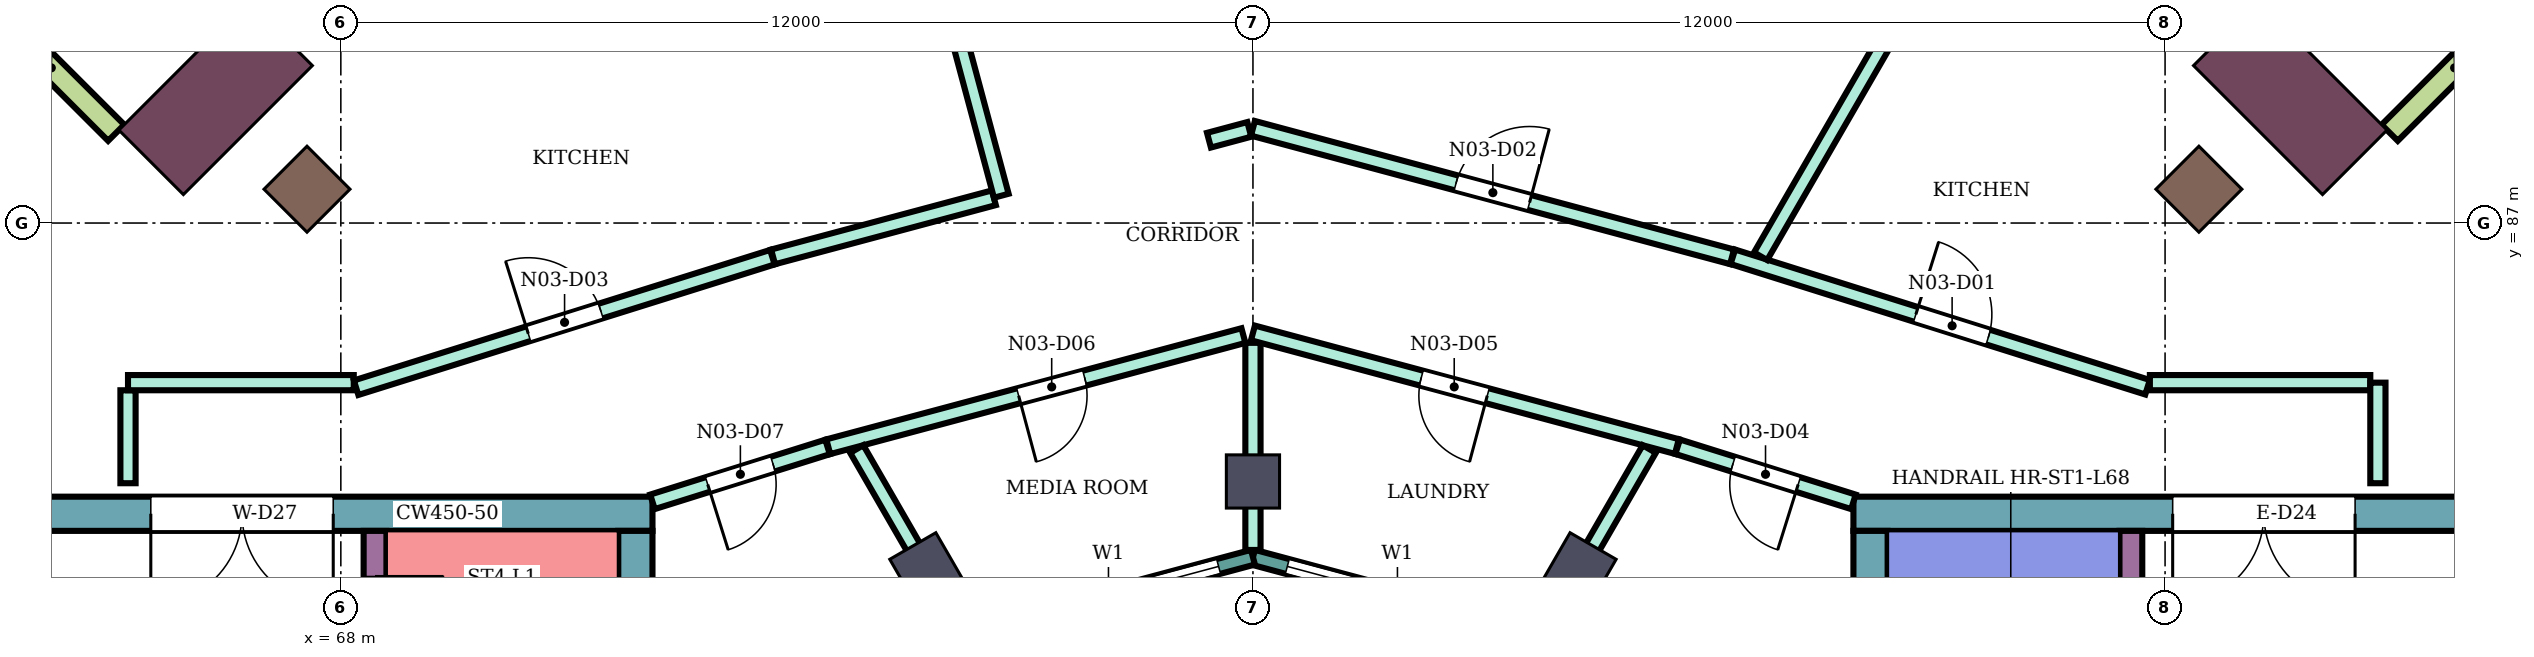
"""IFC4 building model, lengths in metres.
Left out: names, types, materials, properties, quantities, classifications, styles, units other than length and angle.
Written with IfcOpenShell. Run it as: python <this file> out.ifc"""

import sys

from ifc_helpers import new_model, si_unit, direction, frame, frame_2d, origin, origin_2d, place, context, subcontext, project, spatial, rectangle, extrude, element, fill, save


model = new_model("IFC4")
c1 = context("Model", 3, precision=1e-05, world=origin(), true_north=direction((0.0, 1.0)))
c2 = subcontext(c1, "Body", "Model", "MODEL_VIEW")
j1 = project(units=[si_unit("LENGTHUNIT", "METRE"), si_unit("PLANEANGLEUNIT", "RADIAN")], contexts=[c1])
p1 = place(None, origin())
s1 = spatial("IfcSite", under=j1, at=p1, CompositionType="ELEMENT")
p2 = place(p1, origin())
s2 = spatial("IfcBuilding", under=s1, at=p2, CompositionType="ELEMENT")
p3 = place(p2, frame((0.0, 0.0, 296.7)))
s3 = spatial("IfcBuildingStorey", under=s2, at=p3, CompositionType="ELEMENT", Elevation=296.7)
for number, where, z_axis, x_axis in (
    (1, (92.445, 87.445, 0.0), (0.0, 0.0, 1.0), (0.707, 0.707, 0.0)),
    (2, (67.555, 87.445, 0.0), (0.0, 0.0, 1.0), (-0.707, 0.707, 0.0)),
):
    element("IfcColumn", number, at=place(p3, frame(where, z_axis=z_axis, x_axis=x_axis)), inside=s3, PredefinedType="COLUMN", context=c2, shape_type="SweptSolid", body=[
        extrude(rectangle(XDim=0.8, YDim=0.8, at=origin_2d()), origin(), (0.0, 0.0, 1.0), 4.2),
    ])
for number, where, z_axis, x_axis in (
    (3, (84.3, 82.448, 0.0), (0.0, 0.0, 1.0), (0.5, 0.866, 0.0)),
    (4, (80.0, 83.6, 0.0), (0.0, 0.0, 1.0), (0.0, 1.0, 0.0)),
    (5, (75.7, 82.448, 0.0), (0.0, 0.0, 1.0), (-0.5, 0.866, 0.0)),
):
    element("IfcColumn", number, at=place(p3, frame(where, z_axis=z_axis, x_axis=x_axis)), inside=s3, PredefinedType="COLUMN", context=c2, shape_type="SweptSolid", body=[
        extrude(rectangle(XDim=0.7, YDim=0.7, at=origin_2d()), origin(), (0.0, 0.0, 1.0), 4.2),
    ])
for number, where, z_axis, x_axis in (
    (6, (93.647, 88.647, 0.0), (0.0, 0.0, 1.0), (0.707, 0.707, 0.0)),
    (7, (66.353, 88.647, 0.0), (0.0, 0.0, 1.0), (-0.707, 0.707, 0.0)),
):
    element("IfcColumn", number, at=place(p3, frame(where, z_axis=z_axis, x_axis=x_axis)), inside=s3, PredefinedType="COLUMN", context=c2, shape_type="SweptSolid", body=[
        extrude(rectangle(XDim=1.2, YDim=2.4, at=origin_2d()), origin(), (0.0, 0.0, 1.0), 4.2),
    ])
p4 = place(p3, frame((87.9, 83.175, 0.0), z_axis=(0.0, 0.0, 1.0), x_axis=(1.0, 0.0, 0.0)))
e8 = element("IfcWall", 8, at=p4, inside=s3, PredefinedType="SHEAR", context=c2, shape_type="SweptSolid", body=[
    extrude(rectangle(XDim=12.0, YDim=0.45, at=frame_2d((6.0, 0.0))), origin(), (0.0, 0.0, 1.0), 3.88),
])
p5 = place(p4, frame((4.2, 0.0, 0.0)))
e9 = element("IfcOpeningElement", 9, at=p5, cuts=e8, PredefinedType="OPENING", context=c2, shape_type="SweptSolid", body=[
    extrude(rectangle(XDim=2.4, YDim=2.4, at=frame_2d((1.2, 1.2))), frame((0.0, 0.235, 0.0), z_axis=(0.0, -1.0, 0.0), x_axis=(1.0, 0.0, 0.0)), (0.0, 0.0, 1.0), 0.47),
])
p6 = place(p3, frame((88.125, 75.0, 0.0), z_axis=(0.0, 0.0, 1.0), x_axis=(0.0, 1.0, 0.0)))
e10 = element("IfcWall", 10, at=p6, inside=s3, PredefinedType="SHEAR", context=c2, shape_type="SweptSolid", body=[
    extrude(rectangle(XDim=7.95, YDim=0.45, at=frame_2d((3.975, 0.0))), origin(), (0.0, 0.0, 1.0), 3.88),
])
p7 = place(p3, frame((91.55, 75.0, 0.0), z_axis=(0.0, 0.0, 1.0), x_axis=(0.0, 1.0, 0.0)))
e11 = element("IfcWall", 11, at=p7, inside=s3, PredefinedType="SHEAR", context=c2, shape_type="SweptSolid", body=[
    extrude(rectangle(XDim=7.95, YDim=0.3, at=frame_2d((3.975, 0.0))), origin(), (0.0, 0.0, 1.0), 3.88),
])
p8 = place(p7, frame((1.85, 0.0, 0.0)))
e12 = element("IfcOpeningElement", 12, at=p8, cuts=e11, PredefinedType="OPENING", context=c2, shape_type="SweptSolid", body=[
    extrude(rectangle(XDim=0.9, YDim=2.1, at=frame_2d((0.45, 1.05))), frame((0.0, 0.16, 0.0), z_axis=(0.0, -1.0, 0.0), x_axis=(1.0, 0.0, 0.0)), (0.0, 0.0, 1.0), 0.32),
])
p9 = place(p3, frame((72.1, 83.175, 0.0), z_axis=(0.0, 0.0, 1.0), x_axis=(-1.0, 0.0, 0.0)))
e13 = element("IfcWall", 13, at=p9, inside=s3, PredefinedType="SHEAR", context=c2, shape_type="SweptSolid", body=[
    extrude(rectangle(XDim=12.0, YDim=0.45, at=frame_2d((6.0, 0.0))), origin(), (0.0, 0.0, 1.0), 3.88),
])
p10 = place(p9, frame((4.2, 0.0, 0.0)))
e14 = element("IfcOpeningElement", 14, at=p10, cuts=e13, PredefinedType="OPENING", context=c2, shape_type="SweptSolid", body=[
    extrude(rectangle(XDim=2.4, YDim=2.4, at=frame_2d((1.2, 1.2))), frame((0.0, 0.235, 0.0), z_axis=(0.0, -1.0, 0.0), x_axis=(1.0, 0.0, 0.0)), (0.0, 0.0, 1.0), 0.47),
])
p11 = place(p3, frame((71.875, 82.95, 0.0), z_axis=(0.0, 0.0, 1.0), x_axis=(0.0, -1.0, 0.0)))
e15 = element("IfcWall", 15, at=p11, inside=s3, PredefinedType="SHEAR", context=c2, shape_type="SweptSolid", body=[
    extrude(rectangle(XDim=7.95, YDim=0.45, at=frame_2d((3.975, 0.0))), origin(), (0.0, 0.0, 1.0), 3.88),
])
p12 = place(p3, frame((68.45, 82.95, 0.0), z_axis=(0.0, 0.0, 1.0), x_axis=(0.0, -1.0, 0.0)))
e16 = element("IfcWall", 16, at=p12, inside=s3, PredefinedType="SHEAR", context=c2, shape_type="SweptSolid", body=[
    extrude(rectangle(XDim=7.95, YDim=0.3, at=frame_2d((3.975, 0.0))), origin(), (0.0, 0.0, 1.0), 3.88),
])
p13 = place(p12, frame((0.6, 0.0, 0.0)))
e17 = element("IfcOpeningElement", 17, at=p13, cuts=e16, PredefinedType="OPENING", context=c2, shape_type="SweptSolid", body=[
    extrude(rectangle(XDim=0.9, YDim=2.1, at=frame_2d((0.45, 1.05))), frame((0.0, 0.16, 0.0), z_axis=(0.0, -1.0, 0.0), x_axis=(1.0, 0.0, 0.0)), (0.0, 0.0, 1.0), 0.32),
])
for number, where, z_axis, x_axis in (
    (18, (94.955, 88.188, 0.0), (0.0, 0.0, 1.0), (0.707, 0.707, 0.0)),
    (19, (65.045, 88.188, 0.0), (0.0, 0.0, 1.0), (-0.707, 0.707, 0.0)),
):
    element("IfcWall", number, at=place(p3, frame(where, z_axis=z_axis, x_axis=x_axis)), inside=s3, PredefinedType="NOTDEFINED", context=c2, shape_type="SweptSolid", body=[
        extrude(rectangle(XDim=2.416, YDim=0.3, at=frame_2d((1.208, 0.0))), origin(), (0.0, 0.0, 1.0), 4.2),
    ])
p14 = place(p3, frame((83.802, 81.585, 0.0), z_axis=(0.0, 0.0, 1.0), x_axis=(-0.965933654434, 0.258789828301, 0.0)))
e20 = element("IfcWall", 20, at=p14, inside=s3, PredefinedType="NOTDEFINED", context=c2, shape_type="SweptSolid", body=[
    extrude(rectangle(XDim=3.936, YDim=0.2, at=frame_2d((1.968, 0.0))), origin(), (0.0, 0.0, 1.0), 4.2),
])
p15 = place(p14, frame((0.468, 0.0, 0.9)))
e21 = element("IfcOpeningElement", 21, at=p15, cuts=e20, PredefinedType="OPENING", context=c2, shape_type="SweptSolid", body=[
    extrude(rectangle(XDim=3.0, YDim=2.3, at=frame_2d((1.5, 1.15))), frame((0.0, 0.11, 0.0), z_axis=(0.0, -1.0, 0.0), x_axis=(1.0, 0.0, 0.0)), (0.0, 0.0, 1.0), 0.22),
])
p16 = place(p3, frame((80.0, 82.604, 0.0), z_axis=(0.0, 0.0, 1.0), x_axis=(-0.965933654434, -0.258789828301, 0.0)))
e22 = element("IfcWall", 22, at=p16, inside=s3, PredefinedType="NOTDEFINED", context=c2, shape_type="SweptSolid", body=[
    extrude(rectangle(XDim=3.936, YDim=0.2, at=frame_2d((1.968, 0.0))), origin(), (0.0, 0.0, 1.0), 4.2),
])
p17 = place(p16, frame((0.468, 0.0, 0.9)))
e23 = element("IfcOpeningElement", 23, at=p17, cuts=e22, PredefinedType="OPENING", context=c2, shape_type="SweptSolid", body=[
    extrude(rectangle(XDim=3.0, YDim=2.3, at=frame_2d((1.5, 1.15))), frame((0.0, 0.11, 0.0), z_axis=(0.0, -1.0, 0.0), x_axis=(1.0, 0.0, 0.0)), (0.0, 0.0, 1.0), 0.22),
])
p18 = place(p3, frame((65.2, 83.577, 0.0), z_axis=(0.0, 0.0, 1.0), x_axis=(0.0, 1.0, 0.0)))
e24 = element("IfcWall", 24, at=p18, inside=s3, PredefinedType="PARTITIONING", context=c2, shape_type="SweptSolid", body=[
    extrude(rectangle(XDim=1.223, YDim=0.2, at=frame_2d((0.612, 0.0))), origin(), (0.0, 0.0, 1.0), 3.75),
])
p19 = place(p3, frame((65.2, 84.9, 0.0), z_axis=(0.0, 0.0, 1.0), x_axis=(1.0, 0.0, 0.0)))
e25 = element("IfcWall", 25, at=p19, inside=s3, PredefinedType="PARTITIONING", context=c2, shape_type="SweptSolid", body=[
    extrude(rectangle(XDim=2.97, YDim=0.2, at=frame_2d((1.485, 0.0))), origin(), (0.0, 0.0, 1.0), 3.75),
])
p20 = place(p3, frame((68.201, 84.833, 0.0), z_axis=(0.0, 0.0, 1.0), x_axis=(0.95420102455, 0.299166182492, 0.0)))
e26 = element("IfcWall", 26, at=p20, inside=s3, PredefinedType="PARTITIONING", context=c2, shape_type="SweptSolid", body=[
    extrude(rectangle(XDim=5.74, YDim=0.2, at=frame_2d((2.87, 0.0))), origin(), (0.0, 0.0, 1.0), 3.75),
])
p21 = place(p20, frame((2.374, 0.0, 0.0)))
e27 = element("IfcOpeningElement", 27, at=p21, cuts=e26, PredefinedType="OPENING", context=c2, shape_type="SweptSolid", body=[
    extrude(rectangle(XDim=1.0, YDim=2.1, at=frame_2d((0.5, 1.05))), frame((0.0, 0.11, 0.0), z_axis=(0.0, -1.0, 0.0), x_axis=(1.0, 0.0, 0.0)), (0.0, 0.0, 1.0), 0.22),
])
p22 = place(p3, frame((72.1, 83.332, 0.0), z_axis=(0.0, 0.0, 1.0), x_axis=(0.954233106619, 0.299063836383, 0.0)))
e28 = element("IfcWall", 28, at=p22, inside=s3, PredefinedType="PARTITIONING", context=c2, shape_type="SweptSolid", body=[
    extrude(rectangle(XDim=2.414, YDim=0.2, at=frame_2d((1.207, 0.0))), origin(), (0.0, 0.0, 1.0), 3.75),
])
p23 = place(p22, frame((0.762, 0.0, 0.0)))
e29 = element("IfcOpeningElement", 29, at=p23, cuts=e28, PredefinedType="OPENING", context=c2, shape_type="SweptSolid", body=[
    extrude(rectangle(XDim=0.9, YDim=2.1, at=frame_2d((0.45, 1.05))), frame((0.0, 0.11, 0.0), z_axis=(0.0, -1.0, 0.0), x_axis=(1.0, 0.0, 0.0)), (0.0, 0.0, 1.0), 0.22),
])
p24 = place(p3, frame((73.687, 86.555, 0.0), z_axis=(0.0, 0.0, 1.0), x_axis=(0.965987897826, 0.258587279759, 0.0)))
e30 = element("IfcWall", 30, at=p24, inside=s3, PredefinedType="PARTITIONING", context=c2, shape_type="SweptSolid", body=[
    extrude(rectangle(XDim=3.007, YDim=0.2, at=frame_2d((1.503, 0.0))), origin(), (0.0, 0.0, 1.0), 3.75),
])
p25 = place(p3, frame((74.23, 96.538, 0.0), z_axis=(0.0, 0.0, 1.0), x_axis=(0.258775468547, -0.965937501538, 0.0)))
e31 = element("IfcWall", 31, at=p25, inside=s3, PredefinedType="PARTITIONING", context=c2, shape_type="SweptSolid", body=[
    extrude(rectangle(XDim=9.502, YDim=0.2, at=frame_2d((4.751, 0.0))), origin(), (0.0, 0.0, 1.0), 3.75),
])
p26 = place(p3, frame((74.413, 84.057, 0.0), z_axis=(0.0, 0.0, 1.0), x_axis=(0.965972135939, 0.258646153246, 0.0)))
e32 = element("IfcWall", 32, at=p26, inside=s3, PredefinedType="PARTITIONING", context=c2, shape_type="SweptSolid", body=[
    extrude(rectangle(XDim=5.654, YDim=0.2, at=frame_2d((2.827, 0.0))), origin(), (0.0, 0.0, 1.0), 3.75),
])
p27 = place(p26, frame((2.593, 0.0, 0.0)))
e33 = element("IfcOpeningElement", 33, at=p27, cuts=e32, PredefinedType="OPENING", context=c2, shape_type="SweptSolid", body=[
    extrude(rectangle(XDim=0.9, YDim=2.1, at=frame_2d((0.45, 1.05))), frame((0.0, 0.11, 0.0), z_axis=(0.0, -1.0, 0.0), x_axis=(1.0, 0.0, 0.0)), (0.0, 0.0, 1.0), 0.22),
])
p28 = place(p3, frame((74.787, 84.027, 0.0), z_axis=(0.0, 0.0, 1.0), x_axis=(0.500079107518, -0.86597972622, 0.0)))
e34 = element("IfcWall", 34, at=p28, inside=s3, PredefinedType="PARTITIONING", context=c2, shape_type="SweptSolid", body=[
    extrude(rectangle(XDim=2.726, YDim=0.2, at=frame_2d((1.363, 0.0))), origin(), (0.0, 0.0, 1.0), 3.75),
])
p29 = place(p3, frame((79.421, 88.09, 0.0), z_axis=(0.0, 0.0, 1.0), x_axis=(0.966065016104, 0.258299021793, 0.0)))
e35 = element("IfcWall", 35, at=p29, inside=s3, PredefinedType="PARTITIONING", context=c2, shape_type="SweptSolid", body=[
    extrude(rectangle(XDim=0.549, YDim=0.2, at=frame_2d((0.274, 0.0))), origin(), (0.0, 0.0, 1.0), 3.75),
])
p30 = place(p3, frame((80.0, 82.699, 0.0), z_axis=(0.0, 0.0, 1.0), x_axis=(0.0, 1.0, 0.0)))
e36 = element("IfcWall", 36, at=p30, inside=s3, PredefinedType="PARTITIONING", context=c2, shape_type="SweptSolid", body=[
    extrude(rectangle(XDim=2.725, YDim=0.2, at=frame_2d((1.363, 0.0))), origin(), (0.0, 0.0, 1.0), 3.75),
])
p31 = place(p3, frame((80.0, 85.554, 0.0), z_axis=(0.0, 0.0, 1.0), x_axis=(0.965928989968, -0.258807237802, 0.0)))
e37 = element("IfcWall", 37, at=p31, inside=s3, PredefinedType="PARTITIONING", context=c2, shape_type="SweptSolid", body=[
    extrude(rectangle(XDim=5.774, YDim=0.2, at=frame_2d((2.887, 0.0))), origin(), (0.0, 0.0, 1.0), 3.75),
])
p32 = place(p31, frame((2.292, 0.0, 0.0)))
e38 = element("IfcOpeningElement", 38, at=p32, cuts=e37, PredefinedType="OPENING", context=c2, shape_type="SweptSolid", body=[
    extrude(rectangle(XDim=0.9, YDim=2.1, at=frame_2d((0.45, 1.05))), frame((0.0, 0.11, 0.0), z_axis=(0.0, -1.0, 0.0), x_axis=(1.0, 0.0, 0.0)), (0.0, 0.0, 1.0), 0.22),
])
p33 = place(p3, frame((80.0, 88.246, 0.0), z_axis=(0.0, 0.0, 1.0), x_axis=(0.965856994925, -0.259075790752, 0.0)))
e39 = element("IfcWall", 39, at=p33, inside=s3, PredefinedType="PARTITIONING", context=c2, shape_type="SweptSolid", body=[
    extrude(rectangle(XDim=6.526, YDim=0.2, at=frame_2d((3.263, 0.0))), origin(), (0.0, 0.0, 1.0), 3.75),
])
p34 = place(p33, frame((2.768, 0.0, 0.0)))
e40 = element("IfcOpeningElement", 40, at=p34, cuts=e39, PredefinedType="OPENING", context=c2, shape_type="SweptSolid", body=[
    extrude(rectangle(XDim=1.0, YDim=2.1, at=frame_2d((0.5, 1.05))), frame((0.0, 0.11, 0.0), z_axis=(0.0, -1.0, 0.0), x_axis=(1.0, 0.0, 0.0)), (0.0, 0.0, 1.0), 0.22),
])
p35 = place(p3, frame((83.851, 81.666, 0.0), z_axis=(0.0, 0.0, 1.0), x_axis=(0.500146274735, 0.865940935554, 0.0)))
e41 = element("IfcWall", 41, at=p35, inside=s3, PredefinedType="PARTITIONING", context=c2, shape_type="SweptSolid", body=[
    extrude(rectangle(XDim=2.726, YDim=0.2, at=frame_2d((1.363, 0.0))), origin(), (0.0, 0.0, 1.0), 3.75),
])
p36 = place(p3, frame((85.587, 84.057, 0.0), z_axis=(0.0, 0.0, 1.0), x_axis=(0.954239513179, -0.299043393987, 0.0)))
e42 = element("IfcWall", 42, at=p36, inside=s3, PredefinedType="PARTITIONING", context=c2, shape_type="SweptSolid", body=[
    extrude(rectangle(XDim=2.424, YDim=0.2, at=frame_2d((1.212, 0.0))), origin(), (0.0, 0.0, 1.0), 3.75),
])
p37 = place(p36, frame((0.762, 0.0, 0.0)))
e43 = element("IfcOpeningElement", 43, at=p37, cuts=e42, PredefinedType="OPENING", context=c2, shape_type="SweptSolid", body=[
    extrude(rectangle(XDim=0.9, YDim=2.1, at=frame_2d((0.45, 1.05))), frame((0.0, 0.11, 0.0), z_axis=(0.0, -1.0, 0.0), x_axis=(1.0, 0.0, 0.0)), (0.0, 0.0, 1.0), 0.22),
])
p38 = place(p3, frame((86.314, 86.556, 0.0), z_axis=(0.0, 0.0, 1.0), x_axis=(0.953912400139, -0.300085209334, 0.0)))
e44 = element("IfcWall", 44, at=p38, inside=s3, PredefinedType="PARTITIONING", context=c2, shape_type="SweptSolid", body=[
    extrude(rectangle(XDim=5.719, YDim=0.2, at=frame_2d((2.86, 0.0))), origin(), (0.0, 0.0, 1.0), 3.75),
])
p39 = place(p38, frame((2.524, 0.0, 0.0)))
e45 = element("IfcOpeningElement", 45, at=p39, cuts=e44, PredefinedType="OPENING", context=c2, shape_type="SweptSolid", body=[
    extrude(rectangle(XDim=1.0, YDim=2.1, at=frame_2d((0.5, 1.05))), frame((0.0, 0.11, 0.0), z_axis=(0.0, -1.0, 0.0), x_axis=(1.0, 0.0, 0.0)), (0.0, 0.0, 1.0), 0.22),
])
p40 = place(p3, frame((86.679, 86.563, 0.0), z_axis=(0.0, 0.0, 1.0), x_axis=(0.500152516677, 0.865937330331, 0.0)))
e46 = element("IfcWall", 46, at=p40, inside=s3, PredefinedType="PARTITIONING", context=c2, shape_type="SweptSolid", body=[
    extrude(rectangle(XDim=8.943, YDim=0.2, at=frame_2d((4.472, 0.0))), origin(), (0.0, 0.0, 1.0), 3.75),
])
p41 = place(p3, frame((91.8, 84.9, 0.0), z_axis=(0.0, 0.0, 1.0), x_axis=(1.0, 0.0, 0.0)))
e47 = element("IfcWall", 47, at=p41, inside=s3, PredefinedType="PARTITIONING", context=c2, shape_type="SweptSolid", body=[
    extrude(rectangle(XDim=2.9, YDim=0.2, at=frame_2d((1.45, 0.0))), origin(), (0.0, 0.0, 1.0), 3.75),
])
p42 = place(p3, frame((94.8, 83.577, 0.0), z_axis=(0.0, 0.0, 1.0), x_axis=(0.0, 1.0, 0.0)))
e48 = element("IfcWall", 48, at=p42, inside=s3, PredefinedType="PARTITIONING", context=c2, shape_type="SweptSolid", body=[
    extrude(rectangle(XDim=1.323, YDim=0.2, at=frame_2d((0.662, 0.0))), origin(), (0.0, 0.0, 1.0), 3.75),
])
p43 = place(p15, origin())
e49 = element("IfcWindow", 49, at=p43, inside=s3, PartitioningType="SINGLE_PANEL", PredefinedType="WINDOW", context=c2, shape_type="SweptSolid", body=[
    extrude(rectangle(XDim=3.0, YDim=2.3, at=frame_2d((1.5, 1.15))), frame((0.0, 0.03, 0.0), z_axis=(0.0, -1.0, 0.0), x_axis=(1.0, 0.0, 0.0)), (0.0, 0.0, 1.0), 0.06),
])
fill(e21, e49)
p44 = place(p17, origin())
e50 = element("IfcWindow", 50, at=p44, inside=s3, PartitioningType="SINGLE_PANEL", PredefinedType="WINDOW", context=c2, shape_type="SweptSolid", body=[
    extrude(rectangle(XDim=3.0, YDim=2.3, at=frame_2d((1.5, 1.15))), frame((0.0, 0.03, 0.0), z_axis=(0.0, -1.0, 0.0), x_axis=(1.0, 0.0, 0.0)), (0.0, 0.0, 1.0), 0.06),
])
fill(e23, e50)
p45 = place(p39, origin())
e51 = element("IfcDoor", 51, at=p45, inside=s3, OperationType="SINGLE_SWING_LEFT", PredefinedType="DOOR", context=c2, shape_type="SweptSolid", body=[
    extrude(rectangle(XDim=1.0, YDim=2.1, at=frame_2d((0.5, 1.05))), frame((0.0, 0.025, 0.0), z_axis=(0.0, -1.0, 0.0), x_axis=(1.0, 0.0, 0.0)), (0.0, 0.0, 1.0), 0.05),
])
fill(e45, e51)
p46 = place(p34, origin())
e52 = element("IfcDoor", 52, at=p46, inside=s3, OperationType="SINGLE_SWING_RIGHT", PredefinedType="DOOR", context=c2, shape_type="SweptSolid", body=[
    extrude(rectangle(XDim=1.0, YDim=2.1, at=frame_2d((0.5, 1.05))), frame((0.0, 0.025, 0.0), z_axis=(0.0, -1.0, 0.0), x_axis=(1.0, 0.0, 0.0)), (0.0, 0.0, 1.0), 0.05),
])
fill(e40, e52)
p47 = place(p21, origin())
e53 = element("IfcDoor", 53, at=p47, inside=s3, OperationType="SINGLE_SWING_LEFT", PredefinedType="DOOR", context=c2, shape_type="SweptSolid", body=[
    extrude(rectangle(XDim=1.0, YDim=2.1, at=frame_2d((0.5, 1.05))), frame((0.0, 0.025, 0.0), z_axis=(0.0, -1.0, 0.0), x_axis=(1.0, 0.0, 0.0)), (0.0, 0.0, 1.0), 0.05),
])
fill(e27, e53)
p48 = place(p37, frame((0.9, 0.0, 0.0), z_axis=(0.0, 0.0, 1.0), x_axis=(-1.0, 0.0, 0.0)))
e54 = element("IfcDoor", 54, at=p48, inside=s3, OperationType="SINGLE_SWING_LEFT", PredefinedType="DOOR", context=c2, shape_type="SweptSolid", body=[
    extrude(rectangle(XDim=0.9, YDim=2.1, at=frame_2d((0.45, 1.05))), frame((0.0, 0.025, 0.0), z_axis=(0.0, -1.0, 0.0), x_axis=(1.0, 0.0, 0.0)), (0.0, 0.0, 1.0), 0.05),
])
fill(e43, e54)
p49 = place(p32, frame((0.9, 0.0, 0.0), z_axis=(0.0, 0.0, 1.0), x_axis=(-1.0, 0.0, 0.0)))
e55 = element("IfcDoor", 55, at=p49, inside=s3, OperationType="SINGLE_SWING_LEFT", PredefinedType="DOOR", context=c2, shape_type="SweptSolid", body=[
    extrude(rectangle(XDim=0.9, YDim=2.1, at=frame_2d((0.45, 1.05))), frame((0.0, 0.025, 0.0), z_axis=(0.0, -1.0, 0.0), x_axis=(1.0, 0.0, 0.0)), (0.0, 0.0, 1.0), 0.05),
])
fill(e38, e55)
p50 = place(p27, frame((0.9, 0.0, 0.0), z_axis=(0.0, 0.0, 1.0), x_axis=(-1.0, 0.0, 0.0)))
e56 = element("IfcDoor", 56, at=p50, inside=s3, OperationType="SINGLE_SWING_RIGHT", PredefinedType="DOOR", context=c2, shape_type="SweptSolid", body=[
    extrude(rectangle(XDim=0.9, YDim=2.1, at=frame_2d((0.45, 1.05))), frame((0.0, 0.025, 0.0), z_axis=(0.0, -1.0, 0.0), x_axis=(1.0, 0.0, 0.0)), (0.0, 0.0, 1.0), 0.05),
])
fill(e33, e56)
p51 = place(p23, frame((0.9, 0.0, 0.0), z_axis=(0.0, 0.0, 1.0), x_axis=(-1.0, 0.0, 0.0)))
e57 = element("IfcDoor", 57, at=p51, inside=s3, OperationType="SINGLE_SWING_RIGHT", PredefinedType="DOOR", context=c2, shape_type="SweptSolid", body=[
    extrude(rectangle(XDim=0.9, YDim=2.1, at=frame_2d((0.45, 1.05))), frame((0.0, 0.025, 0.0), z_axis=(0.0, -1.0, 0.0), x_axis=(1.0, 0.0, 0.0)), (0.0, 0.0, 1.0), 0.05),
])
fill(e29, e57)
p52 = place(p5, frame((2.4, 0.0, 0.0), z_axis=(0.0, 0.0, 1.0), x_axis=(-1.0, 0.0, 0.0)))
e58 = element("IfcDoor", 58, at=p52, inside=s3, OperationType="DOUBLE_DOOR_SINGLE_SWING", PredefinedType="DOOR", context=c2, shape_type="SweptSolid", body=[
    extrude(rectangle(XDim=2.4, YDim=2.4, at=frame_2d((1.2, 1.2))), frame((0.0, 0.025, 0.0), z_axis=(0.0, -1.0, 0.0), x_axis=(1.0, 0.0, 0.0)), (0.0, 0.0, 1.0), 0.05),
])
fill(e9, e58)
p53 = place(p13, origin())
e59 = element("IfcDoor", 59, at=p53, inside=s3, OperationType="SINGLE_SWING_LEFT", PredefinedType="DOOR", context=c2, shape_type="SweptSolid", body=[
    extrude(rectangle(XDim=0.9, YDim=2.1, at=frame_2d((0.45, 1.05))), frame((0.0, 0.025, 0.0), z_axis=(0.0, -1.0, 0.0), x_axis=(1.0, 0.0, 0.0)), (0.0, 0.0, 1.0), 0.05),
])
fill(e17, e59)
p54 = place(p10, origin())
e60 = element("IfcDoor", 60, at=p54, inside=s3, OperationType="DOUBLE_DOOR_SINGLE_SWING", PredefinedType="DOOR", context=c2, shape_type="SweptSolid", body=[
    extrude(rectangle(XDim=2.4, YDim=2.4, at=frame_2d((1.2, 1.2))), frame((0.0, 0.025, 0.0), z_axis=(0.0, -1.0, 0.0), x_axis=(1.0, 0.0, 0.0)), (0.0, 0.0, 1.0), 0.05),
])
fill(e14, e60)
save(model, sys.argv[1])
